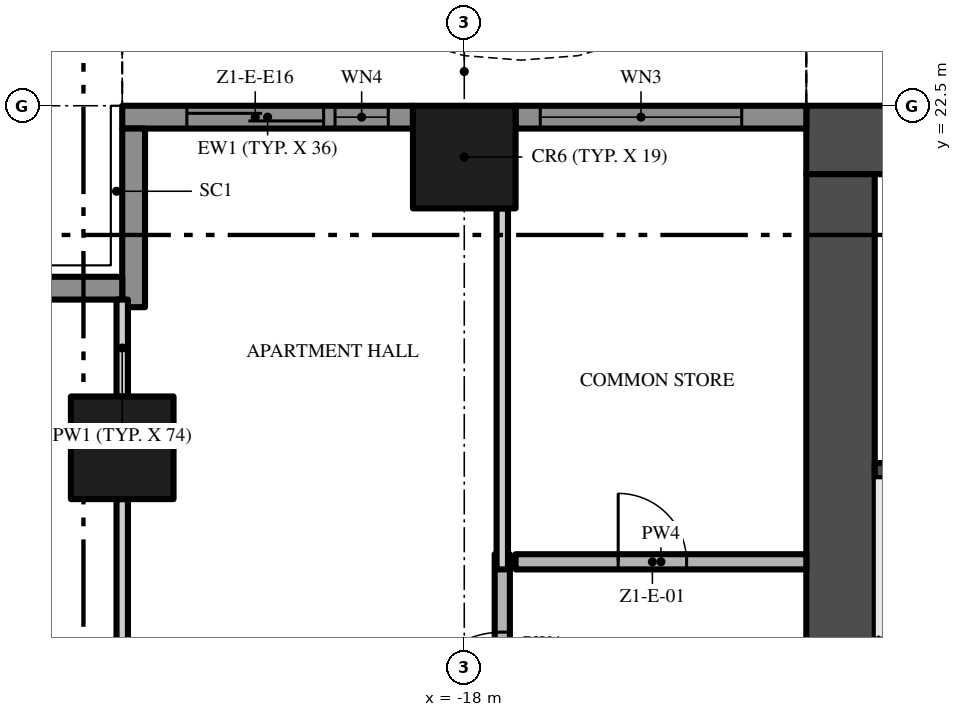
"""IFC4 building model, lengths in metres.
Left out: names, types, materials, properties, quantities, classifications, styles, units other than length and angle.
Written with IfcOpenShell. Run it as: python <this file> out.ifc"""

import sys

from ifc_helpers import new_model, si_unit, direction, frame, frame_2d, origin, origin_2d, place, context, subcontext, project, spatial, polyline, rectangle, outline, extrude, element, fill, save


model = new_model("IFC4")
c1 = context("Model", 3, precision=1e-05, world=origin(), true_north=direction((0.0, 1.0)))
c2 = subcontext(c1, "Body", "Model", "MODEL_VIEW")
j1 = project(units=[si_unit("LENGTHUNIT", "METRE"), si_unit("PLANEANGLEUNIT", "RADIAN")], contexts=[c1])
p1 = place(None, origin())
s1 = spatial("IfcSite", under=j1, at=p1, CompositionType="ELEMENT")
p2 = place(p1, origin())
s2 = spatial("IfcBuilding", under=s1, at=p2, CompositionType="ELEMENT")
p3 = place(p2, frame((0.0, 0.0, 60.6)))
s3 = spatial("IfcBuildingStorey", under=s2, at=p3, CompositionType="ELEMENT", Elevation=60.6)
p4 = place(p3, frame((13.5, 22.05, -0.3), z_axis=(0.0, 0.0, 1.0), x_axis=(-1.0, 0.0, 0.0)))
e1 = element("IfcWall", 1, at=p4, inside=s3, PredefinedType="SHEAR", context=c2, shape_type="SweptSolid", body=[
    extrude(rectangle(XDim=27.0, YDim=0.9, at=frame_2d((13.5, 0.0))), origin(), (0.0, 0.0, 1.0), 3.8),
])
p5 = place(p3, frame((-13.05, 21.6, -0.3), z_axis=(0.0, 0.0, 1.0), x_axis=(0.0, -1.0, 0.0)))
e2 = element("IfcWall", 2, at=p5, inside=s3, PredefinedType="SHEAR", context=c2, shape_type="SweptSolid", body=[
    extrude(rectangle(XDim=16.2, YDim=0.9, at=frame_2d((8.1, 0.0))), origin(), (0.0, 0.0, 1.0), 3.8),
])
p6 = place(p5, frame((9.0, 0.0, 0.3)))
e3 = element("IfcOpeningElement", 3, at=p6, cuts=e2, PredefinedType="OPENING", context=c2, shape_type="SweptSolid", body=[
    extrude(rectangle(XDim=1.2, YDim=2.2, at=frame_2d((0.6, 1.1))), frame((0.0, 0.46, 0.0), z_axis=(0.0, -1.0, 0.0), x_axis=(1.0, 0.0, 0.0)), (0.0, 0.0, 1.0), 0.92),
])
for number, where, z_axis, x_axis in (
    (4, (-18.0, 21.825, 0.0), (0.0, 0.0, 1.0), (1.0, 0.0, 0.0)),
    (5, (-22.5, 18.0, 0.0), (0.0, 0.0, 1.0), (1.0, 0.0, 0.0)),
):
    element("IfcColumn", number, at=place(p3, frame(where, z_axis=z_axis, x_axis=x_axis)), inside=s3, PredefinedType="COLUMN", context=c2, shape_type="SweptSolid", body=[
        extrude(rectangle(XDim=1.35, YDim=1.35, at=origin_2d()), origin(), (0.0, 0.0, 1.0), 3.5),
    ])
p7 = place(p3, frame((-17.325, 22.35, 0.0), z_axis=(0.0, 0.0, 1.0), x_axis=(1.0, 0.0, 0.0)))
e6 = element("IfcWall", 6, at=p7, inside=s3, PredefinedType="SOLIDWALL", context=c2, shape_type="SweptSolid", body=[
    extrude(rectangle(XDim=3.825, YDim=0.3, at=frame_2d((1.913, 0.0))), origin(), (0.0, 0.0, 1.0), 3.5),
])
p8 = place(p7, frame((0.325, 0.0, 0.45)))
e7 = element("IfcOpeningElement", 7, at=p8, cuts=e6, PredefinedType="OPENING", context=c2, shape_type="SweptSolid", body=[
    extrude(rectangle(XDim=2.65, YDim=2.65, at=frame_2d((1.325, 1.325))), frame((0.0, 0.16, 0.0), z_axis=(0.0, -1.0, 0.0), x_axis=(1.0, 0.0, 0.0)), (0.0, 0.0, 1.0), 0.32),
])
p9 = place(p3, frame((-22.5, 22.35, 0.0), z_axis=(0.0, 0.0, 1.0), x_axis=(1.0, 0.0, 0.0)))
e8 = element("IfcWall", 8, at=p9, inside=s3, PredefinedType="SOLIDWALL", context=c2, shape_type="SweptSolid", body=[
    extrude(rectangle(XDim=3.825, YDim=0.3, at=frame_2d((1.913, 0.0))), origin(), (0.0, 0.0, 1.0), 3.5),
])
p10 = place(p9, frame((2.8, 0.0, 0.45)))
e9 = element("IfcOpeningElement", 9, at=p10, cuts=e8, PredefinedType="OPENING", context=c2, shape_type="SweptSolid", body=[
    extrude(rectangle(XDim=0.7, YDim=2.65, at=frame_2d((0.35, 1.325))), frame((0.0, 0.16, 0.0), z_axis=(0.0, -1.0, 0.0), x_axis=(1.0, 0.0, 0.0)), (0.0, 0.0, 1.0), 0.32),
])
p11 = place(p9, frame((0.85, 0.0, 0.0)))
e10 = element("IfcOpeningElement", 10, at=p11, cuts=e8, PredefinedType="OPENING", context=c2, shape_type="SweptSolid", body=[
    extrude(rectangle(XDim=1.8, YDim=2.4, at=frame_2d((0.9, 1.2))), frame((0.0, 0.16, 0.0), z_axis=(0.0, -1.0, 0.0), x_axis=(1.0, 0.0, 0.0)), (0.0, 0.0, 1.0), 0.32),
])
p12 = place(p3, frame((-22.35, 19.85, 0.0), z_axis=(0.0, 0.0, 1.0), x_axis=(0.0, 1.0, 0.0)))
e11 = element("IfcWall", 11, at=p12, inside=s3, PredefinedType="SOLIDWALL", context=c2, shape_type="SweptSolid", body=[
    extrude(rectangle(XDim=2.35, YDim=0.3, at=frame_2d((1.175, 0.0))), origin(), (0.0, 0.0, 1.0), 3.5),
])
p13 = place(p3, frame((-24.75, 20.1, 0.0), z_axis=(0.0, 0.0, 1.0), x_axis=(1.0, 0.0, 0.0)))
e12 = element("IfcWall", 12, at=p13, inside=s3, PredefinedType="SOLIDWALL", context=c2, shape_type="SweptSolid", body=[
    extrude(rectangle(XDim=2.25, YDim=0.3, at=frame_2d((1.125, 0.0))), origin(), (0.0, 0.0, 1.0), 3.5),
])
p14 = place(p3, origin())
e13 = element("IfcWall", 13, at=p14, inside=s3, PredefinedType="USERDEFINED", context=c2, shape_type="SweptSolid", body=[
    extrude(outline(polyline([(-13.5, 24.3), (-15.0, 23.595), (-16.5, 23.159), (-17.25, 23.1), (-18.0, 23.159), (-19.5, 23.595), (-21.0, 24.3), (-22.5, 25.005), (-22.606, 24.779), (-21.106, 24.074), (-19.589, 23.36), (-18.045, 22.911), (-17.25, 22.849), (-16.455, 22.911), (-14.911, 23.36), (-13.394, 24.074), (-13.5, 24.3)])), origin(), (0.0, 0.0, 1.0), 0.9),
])
p15 = place(p3, frame((-12.6, 17.7, 0.0), z_axis=(0.0, 0.0, 1.0), x_axis=(1.0, 0.0, 0.0)))
e14 = element("IfcWall", 14, at=p15, inside=s3, PredefinedType="SHEAR", context=c2, shape_type="SweptSolid", body=[
    extrude(rectangle(XDim=2.95, YDim=0.2, at=frame_2d((1.475, 0.0))), origin(), (0.0, 0.0, 1.0), 3.5),
])
p16 = place(p3, frame((-17.325, 16.5, 0.0), z_axis=(0.0, 0.0, 1.0), x_axis=(1.0, 0.0, 0.0)))
e15 = element("IfcWall", 15, at=p16, inside=s3, PredefinedType="PARTITIONING", context=c2, shape_type="SweptSolid", body=[
    extrude(rectangle(XDim=3.825, YDim=0.2, at=frame_2d((1.913, 0.0))), origin(), (0.0, 0.0, 1.0), 3.5),
])
p17 = place(p16, frame((1.35, 0.0, 0.0)))
e16 = element("IfcOpeningElement", 16, at=p17, cuts=e15, PredefinedType="OPENING", context=c2, shape_type="SweptSolid", body=[
    extrude(rectangle(XDim=0.9, YDim=2.1, at=frame_2d((0.45, 1.05))), frame((0.0, 0.11, 0.0), z_axis=(0.0, -1.0, 0.0), x_axis=(1.0, 0.0, 0.0)), (0.0, 0.0, 1.0), 0.22),
])
p18 = place(p3, frame((-22.5, 0.1, 0.0), z_axis=(0.0, 0.0, 1.0), x_axis=(0.0, 1.0, 0.0)))
e17 = element("IfcWall", 17, at=p18, inside=s3, PredefinedType="PARTITIONING", context=c2, shape_type="SweptSolid", body=[
    extrude(rectangle(XDim=17.225, YDim=0.15, at=frame_2d((8.613, 0.0))), origin(), (0.0, 0.0, 1.0), 3.5),
])
p19 = place(p18, frame((1.65, 0.0, 0.0)))
e18 = element("IfcOpeningElement", 18, at=p19, cuts=e17, PredefinedType="OPENING", context=c2, shape_type="SweptSolid", body=[
    extrude(rectangle(XDim=1.0, YDim=2.4, at=frame_2d((0.5, 1.2))), frame((0.0, 0.085, 0.0), z_axis=(0.0, -1.0, 0.0), x_axis=(1.0, 0.0, 0.0)), (0.0, 0.0, 1.0), 0.17),
])
p20 = place(p18, frame((5.0, 0.0, 0.0)))
e19 = element("IfcOpeningElement", 19, at=p20, cuts=e17, PredefinedType="OPENING", context=c2, shape_type="SweptSolid", body=[
    extrude(rectangle(XDim=1.0, YDim=2.4, at=frame_2d((0.5, 1.2))), frame((0.0, 0.085, 0.0), z_axis=(0.0, -1.0, 0.0), x_axis=(1.0, 0.0, 0.0)), (0.0, 0.0, 1.0), 0.17),
])
p21 = place(p18, frame((13.25, 0.0, 0.0)))
e20 = element("IfcOpeningElement", 20, at=p21, cuts=e17, PredefinedType="OPENING", context=c2, shape_type="SweptSolid", body=[
    extrude(rectangle(XDim=1.8, YDim=2.4, at=frame_2d((0.9, 1.2))), frame((0.0, 0.085, 0.0), z_axis=(0.0, -1.0, 0.0), x_axis=(1.0, 0.0, 0.0)), (0.0, 0.0, 1.0), 0.17),
])
p22 = place(p3, frame((-22.5, 18.675, 0.0), z_axis=(0.0, 0.0, 1.0), x_axis=(0.0, 1.0, 0.0)))
e21 = element("IfcWall", 21, at=p22, inside=s3, PredefinedType="PARTITIONING", context=c2, shape_type="SweptSolid", body=[
    extrude(rectangle(XDim=1.275, YDim=0.15, at=frame_2d((0.637, 0.0))), origin(), (0.0, 0.0, 1.0), 3.5),
])
p23 = place(p3, frame((-17.5, 14.225, 0.0), z_axis=(0.0, 0.0, 1.0), x_axis=(0.0, 1.0, 0.0)))
e22 = element("IfcWall", 22, at=p23, inside=s3, PredefinedType="PARTITIONING", context=c2, shape_type="SweptSolid", body=[
    extrude(rectangle(XDim=2.375, YDim=0.2, at=frame_2d((1.188, 0.0))), origin(), (0.0, 0.0, 1.0), 3.5),
])
p24 = place(p23, frame((0.15, 0.0, 0.0)))
e23 = element("IfcOpeningElement", 23, at=p24, cuts=e22, PredefinedType="OPENING", context=c2, shape_type="SweptSolid", body=[
    extrude(rectangle(XDim=1.2, YDim=2.4, at=frame_2d((0.6, 1.2))), frame((0.0, 0.11, 0.0), z_axis=(0.0, -1.0, 0.0), x_axis=(1.0, 0.0, 0.0)), (0.0, 0.0, 1.0), 0.22),
])
p25 = place(p3, frame((-17.5, 16.4, 0.0), z_axis=(0.0, 0.0, 1.0), x_axis=(0.0, 1.0, 0.0)))
e24 = element("IfcWall", 24, at=p25, inside=s3, PredefinedType="PARTITIONING", context=c2, shape_type="SweptSolid", body=[
    extrude(rectangle(XDim=4.75, YDim=0.15, at=frame_2d((2.375, 0.0))), origin(), (0.0, 0.0, 1.0), 3.5),
])
p26 = place(p8, origin())
e25 = element("IfcWindow", 25, at=p26, inside=s3, PartitioningType="SINGLE_PANEL", PredefinedType="WINDOW", context=c2, shape_type="SweptSolid", body=[
    extrude(rectangle(XDim=2.65, YDim=2.65, at=frame_2d((1.325, 1.325))), frame((0.0, 0.03, 0.0), z_axis=(0.0, -1.0, 0.0), x_axis=(1.0, 0.0, 0.0)), (0.0, 0.0, 1.0), 0.06),
])
fill(e7, e25)
p27 = place(p10, origin())
e26 = element("IfcWindow", 26, at=p27, inside=s3, PartitioningType="SINGLE_PANEL", PredefinedType="WINDOW", context=c2, shape_type="SweptSolid", body=[
    extrude(rectangle(XDim=0.7, YDim=2.65, at=frame_2d((0.35, 1.325))), frame((0.0, 0.03, 0.0), z_axis=(0.0, -1.0, 0.0), x_axis=(1.0, 0.0, 0.0)), (0.0, 0.0, 1.0), 0.06),
])
fill(e9, e26)
p28 = place(p11, origin())
e27 = element("IfcDoor", 27, at=p28, inside=s3, OperationType="SINGLE_SWING_LEFT", PredefinedType="DOOR", context=c2, shape_type="SweptSolid", body=[
    extrude(rectangle(XDim=1.8, YDim=2.4, at=frame_2d((0.9, 1.2))), frame((0.0, 0.025, 0.0), z_axis=(0.0, -1.0, 0.0), x_axis=(1.0, 0.0, 0.0)), (0.0, 0.0, 1.0), 0.05),
])
fill(e10, e27)
p29 = place(p17, origin())
e28 = element("IfcDoor", 28, at=p29, inside=s3, OperationType="SINGLE_SWING_LEFT", PredefinedType="DOOR", context=c2, shape_type="SweptSolid", body=[
    extrude(rectangle(XDim=0.9, YDim=2.1, at=frame_2d((0.45, 1.05))), frame((0.0, 0.025, 0.0), z_axis=(0.0, -1.0, 0.0), x_axis=(1.0, 0.0, 0.0)), (0.0, 0.0, 1.0), 0.05),
])
fill(e16, e28)
p30 = place(p24, origin())
e29 = element("IfcDoor", 29, at=p30, inside=s3, OperationType="SINGLE_SWING_LEFT", PredefinedType="DOOR", context=c2, shape_type="SweptSolid", body=[
    extrude(rectangle(XDim=1.2, YDim=2.4, at=frame_2d((0.6, 1.2))), frame((0.0, 0.025, 0.0), z_axis=(0.0, -1.0, 0.0), x_axis=(1.0, 0.0, 0.0)), (0.0, 0.0, 1.0), 0.05),
])
fill(e23, e29)
save(model, sys.argv[1])
